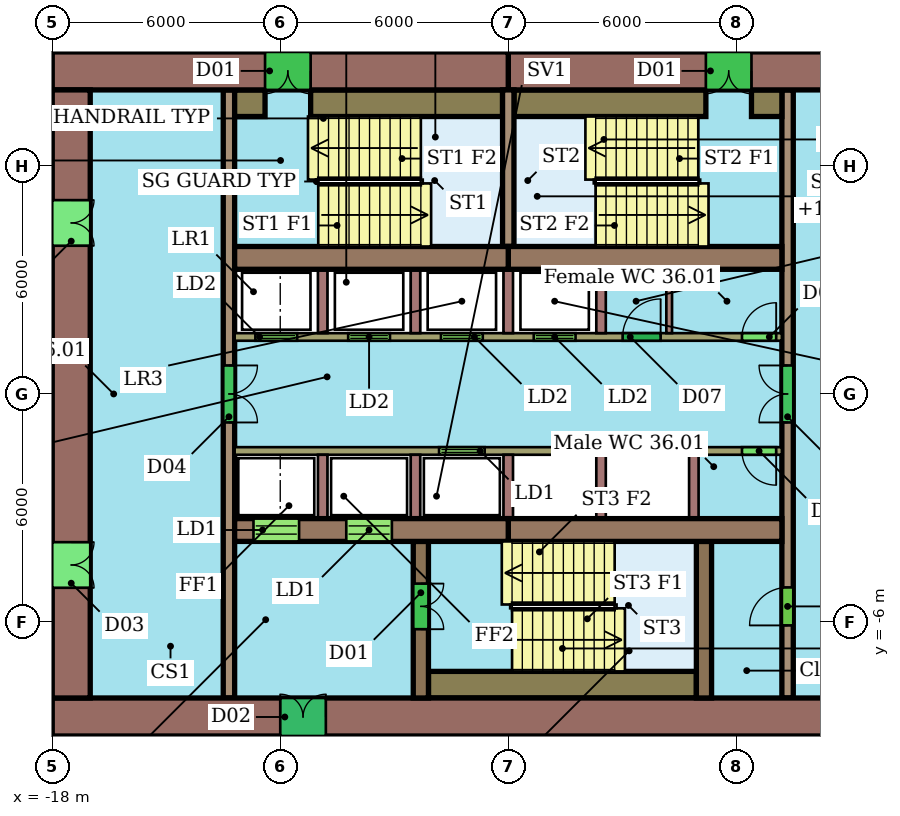
"""IFC4 building model, lengths in metres.
Left out: names, types, materials, properties, quantities, classifications, styles, units other than length and angle.
Written with IfcOpenShell. Run it as: python <this file> out.ifc"""

import sys

from ifc_helpers import new_model, si_unit, direction, frame, frame_2d, origin, place, context, subcontext, project, spatial, rectangle, extrude, element, fill, save


model = new_model("IFC4")
c1 = context("Model", 3, precision=1e-05, world=origin(), true_north=direction((0.0, 1.0)))
c2 = subcontext(c1, "Body", "Model", "MODEL_VIEW")
j1 = project(units=[si_unit("LENGTHUNIT", "METRE"), si_unit("PLANEANGLEUNIT", "RADIAN")], contexts=[c1])
p1 = place(None, origin())
s1 = spatial("IfcSite", under=j1, at=p1, CompositionType="ELEMENT")
p2 = place(p1, origin())
s2 = spatial("IfcBuilding", under=s1, at=p2, CompositionType="ELEMENT")
p3 = place(p2, frame((0.0, 0.0, 154.2)))
s3 = spatial("IfcBuildingStorey", under=s2, at=p3, CompositionType="ELEMENT", Elevation=154.2)
p4 = place(p3, frame((6.0, 8.5, 0.0), z_axis=(0.0, 0.0, 1.0), x_axis=(-1.0, 0.0, 0.0)))
e1 = element("IfcWall", 1, at=p4, inside=s3, PredefinedType="SHEAR", context=c2, shape_type="SweptSolid", body=[
    extrude(rectangle(XDim=12.0, YDim=1.0, at=frame_2d((6.0, 0.0))), origin(), (0.0, 0.0, 1.0), 3.3),
])
p5 = place(p4, frame((5.6, 0.0, 0.0)))
e2 = element("IfcOpeningElement", 2, at=p5, cuts=e1, PredefinedType="OPENING", context=c2, shape_type="SweptSolid", body=[
    extrude(rectangle(XDim=1.2, YDim=2.1, at=frame_2d((0.6, 1.05))), frame((0.0, 0.51, 0.0), z_axis=(0.0, -1.0, 0.0), x_axis=(1.0, 0.0, 0.0)), (0.0, 0.0, 1.0), 1.02),
])
p6 = place(p3, frame((-6.0, 8.5, 0.0), z_axis=(0.0, 0.0, 1.0), x_axis=(-1.0, 0.0, 0.0)))
e3 = element("IfcWall", 3, at=p6, inside=s3, PredefinedType="SHEAR", context=c2, shape_type="SweptSolid", body=[
    extrude(rectangle(XDim=12.0, YDim=1.0, at=frame_2d((6.0, 0.0))), origin(), (0.0, 0.0, 1.0), 3.3),
])
p7 = place(p6, frame((5.2, 0.0, 0.0)))
e4 = element("IfcOpeningElement", 4, at=p7, cuts=e3, PredefinedType="OPENING", context=c2, shape_type="SweptSolid", body=[
    extrude(rectangle(XDim=1.2, YDim=2.1, at=frame_2d((0.6, 1.05))), frame((0.0, 0.51, 0.0), z_axis=(0.0, -1.0, 0.0), x_axis=(1.0, 0.0, 0.0)), (0.0, 0.0, 1.0), 1.02),
])
p8 = place(p3, frame((-18.0, -8.5, 0.0), z_axis=(0.0, 0.0, 1.0), x_axis=(1.0, 0.0, 0.0)))
e5 = element("IfcWall", 5, at=p8, inside=s3, PredefinedType="SHEAR", context=c2, shape_type="SweptSolid", body=[
    extrude(rectangle(XDim=24.0, YDim=1.0, at=frame_2d((12.0, 0.0))), origin(), (0.0, 0.0, 1.0), 3.3),
])
p9 = place(p8, frame((6.0, 0.0, 0.0)))
e6 = element("IfcOpeningElement", 6, at=p9, cuts=e5, PredefinedType="OPENING", context=c2, shape_type="SweptSolid", body=[
    extrude(rectangle(XDim=1.2, YDim=2.1, at=frame_2d((0.6, 1.05))), frame((0.0, 0.51, 0.0), z_axis=(0.0, -1.0, 0.0), x_axis=(1.0, 0.0, 0.0)), (0.0, 0.0, 1.0), 1.02),
])
p10 = place(p3, frame((-17.5, 8.0, 0.0), z_axis=(0.0, 0.0, 1.0), x_axis=(0.0, -1.0, 0.0)))
e7 = element("IfcWall", 7, at=p10, inside=s3, PredefinedType="SHEAR", context=c2, shape_type="SweptSolid", body=[
    extrude(rectangle(XDim=16.0, YDim=1.0, at=frame_2d((8.0, 0.0))), origin(), (0.0, 0.0, 1.0), 3.3),
])
p11 = place(p10, frame((11.9, 0.0, 0.0)))
e8 = element("IfcOpeningElement", 8, at=p11, cuts=e7, PredefinedType="OPENING", context=c2, shape_type="SweptSolid", body=[
    extrude(rectangle(XDim=1.2, YDim=2.1, at=frame_2d((0.6, 1.05))), frame((0.0, 0.51, 0.0), z_axis=(0.0, -1.0, 0.0), x_axis=(1.0, 0.0, 0.0)), (0.0, 0.0, 1.0), 1.02),
])
p12 = place(p10, frame((2.9, 0.0, 0.0)))
e9 = element("IfcOpeningElement", 9, at=p12, cuts=e7, PredefinedType="OPENING", context=c2, shape_type="SweptSolid", body=[
    extrude(rectangle(XDim=1.2, YDim=2.1, at=frame_2d((0.6, 1.05))), frame((0.0, 0.51, 0.0), z_axis=(0.0, -1.0, 0.0), x_axis=(1.0, 0.0, 0.0)), (0.0, 0.0, 1.0), 1.02),
])
for number, where, z_axis, x_axis in (
    (10, (-13.2, 3.58, 0.0), (0.0, 0.0, 1.0), (1.0, 0.0, 0.0)),
    (11, (-6.0, 3.58, 0.0), (0.0, 0.0, 1.0), (1.0, 0.0, 0.0)),
):
    element("IfcWall", number, at=place(p3, frame(where, z_axis=z_axis, x_axis=x_axis)), inside=s3, PredefinedType="SHEAR", context=c2, shape_type="SweptSolid", body=[
        extrude(rectangle(XDim=7.2, YDim=0.6, at=frame_2d((3.6, 0.0))), origin(), (0.0, 0.0, 1.0), 3.3),
    ])
p13 = place(p3, frame((-13.2, -3.58, 0.0), z_axis=(0.0, 0.0, 1.0), x_axis=(1.0, 0.0, 0.0)))
e12 = element("IfcWall", 12, at=p13, inside=s3, PredefinedType="SHEAR", context=c2, shape_type="SweptSolid", body=[
    extrude(rectangle(XDim=7.2, YDim=0.6, at=frame_2d((3.6, 0.0))), origin(), (0.0, 0.0, 1.0), 3.3),
])
p14 = place(p13, frame((0.496, 0.0, 0.0)))
e13 = element("IfcOpeningElement", 13, at=p14, cuts=e12, PredefinedType="OPENING", context=c2, shape_type="SweptSolid", body=[
    extrude(rectangle(XDim=1.2, YDim=2.1, at=frame_2d((0.6, 1.05))), frame((0.0, 0.31, 0.0), z_axis=(0.0, -1.0, 0.0), x_axis=(1.0, 0.0, 0.0)), (0.0, 0.0, 1.0), 0.62),
])
p15 = place(p13, frame((2.938, 0.0, 0.0)))
e14 = element("IfcOpeningElement", 14, at=p15, cuts=e12, PredefinedType="OPENING", context=c2, shape_type="SweptSolid", body=[
    extrude(rectangle(XDim=1.2, YDim=2.1, at=frame_2d((0.6, 1.05))), frame((0.0, 0.31, 0.0), z_axis=(0.0, -1.0, 0.0), x_axis=(1.0, 0.0, 0.0)), (0.0, 0.0, 1.0), 0.62),
])
p16 = place(p3, frame((-6.0, -3.58, 0.0), z_axis=(0.0, 0.0, 1.0), x_axis=(1.0, 0.0, 0.0)))
e15 = element("IfcWall", 15, at=p16, inside=s3, PredefinedType="SHEAR", context=c2, shape_type="SweptSolid", body=[
    extrude(rectangle(XDim=7.2, YDim=0.6, at=frame_2d((3.6, 0.0))), origin(), (0.0, 0.0, 1.0), 3.3),
])
p17 = place(p3, frame((-13.35, 8.0, 0.0), z_axis=(0.0, 0.0, 1.0), x_axis=(0.0, -1.0, 0.0)))
e16 = element("IfcWall", 16, at=p17, inside=s3, PredefinedType="SHEAR", context=c2, shape_type="SweptSolid", body=[
    extrude(rectangle(XDim=16.0, YDim=0.3, at=frame_2d((8.0, 0.0))), origin(), (0.0, 0.0, 1.0), 3.3),
])
p18 = place(p17, frame((7.25, 0.0, 0.0)))
e17 = element("IfcOpeningElement", 17, at=p18, cuts=e16, PredefinedType="OPENING", context=c2, shape_type="SweptSolid", body=[
    extrude(rectangle(XDim=1.5, YDim=2.1, at=frame_2d((0.75, 1.05))), frame((0.0, 0.16, 0.0), z_axis=(0.0, -1.0, 0.0), x_axis=(1.0, 0.0, 0.0)), (0.0, 0.0, 1.0), 0.32),
])
p19 = place(p3, frame((1.35, -8.0, 0.0), z_axis=(0.0, 0.0, 1.0), x_axis=(0.0, 1.0, 0.0)))
e18 = element("IfcWall", 18, at=p19, inside=s3, PredefinedType="SHEAR", context=c2, shape_type="SweptSolid", body=[
    extrude(rectangle(XDim=16.0, YDim=0.3, at=frame_2d((8.0, 0.0))), origin(), (0.0, 0.0, 1.0), 3.3),
])
p20 = place(p19, frame((1.91, 0.0, 0.0)))
e19 = element("IfcOpeningElement", 19, at=p20, cuts=e18, PredefinedType="OPENING", context=c2, shape_type="SweptSolid", body=[
    extrude(rectangle(XDim=1.0, YDim=2.1, at=frame_2d((0.5, 1.05))), frame((0.0, 0.16, 0.0), z_axis=(0.0, -1.0, 0.0), x_axis=(1.0, 0.0, 0.0)), (0.0, 0.0, 1.0), 0.32),
])
p21 = place(p19, frame((7.25, 0.0, 0.0)))
e20 = element("IfcOpeningElement", 20, at=p21, cuts=e18, PredefinedType="OPENING", context=c2, shape_type="SweptSolid", body=[
    extrude(rectangle(XDim=1.5, YDim=2.1, at=frame_2d((0.75, 1.05))), frame((0.0, 0.16, 0.0), z_axis=(0.0, -1.0, 0.0), x_axis=(1.0, 0.0, 0.0)), (0.0, 0.0, 1.0), 0.32),
])
p22 = place(p3, frame((-13.2, 1.5, 0.0), z_axis=(0.0, 0.0, 1.0), x_axis=(1.0, 0.0, 0.0)))
e21 = element("IfcWall", 21, at=p22, inside=s3, PredefinedType="SHEAR", context=c2, shape_type="SweptSolid", body=[
    extrude(rectangle(XDim=14.4, YDim=0.2, at=frame_2d((7.2, 0.0))), origin(), (0.0, 0.0, 1.0), 3.3),
])
p23 = place(p22, frame((0.546, 0.0, 0.0)))
e22 = element("IfcOpeningElement", 22, at=p23, cuts=e21, PredefinedType="OPENING", context=c2, shape_type="SweptSolid", body=[
    extrude(rectangle(XDim=1.1, YDim=2.1, at=frame_2d((0.55, 1.05))), frame((0.0, 0.11, 0.0), z_axis=(0.0, -1.0, 0.0), x_axis=(1.0, 0.0, 0.0)), (0.0, 0.0, 1.0), 0.22),
])
p24 = place(p22, frame((2.988, 0.0, 0.0)))
e23 = element("IfcOpeningElement", 23, at=p24, cuts=e21, PredefinedType="OPENING", context=c2, shape_type="SweptSolid", body=[
    extrude(rectangle(XDim=1.1, YDim=2.1, at=frame_2d((0.55, 1.05))), frame((0.0, 0.11, 0.0), z_axis=(0.0, -1.0, 0.0), x_axis=(1.0, 0.0, 0.0)), (0.0, 0.0, 1.0), 0.22),
])
p25 = place(p22, frame((5.429, 0.0, 0.0)))
e24 = element("IfcOpeningElement", 24, at=p25, cuts=e21, PredefinedType="OPENING", context=c2, shape_type="SweptSolid", body=[
    extrude(rectangle(XDim=1.1, YDim=2.1, at=frame_2d((0.55, 1.05))), frame((0.0, 0.11, 0.0), z_axis=(0.0, -1.0, 0.0), x_axis=(1.0, 0.0, 0.0)), (0.0, 0.0, 1.0), 0.22),
])
p26 = place(p22, frame((7.871, 0.0, 0.0)))
e25 = element("IfcOpeningElement", 25, at=p26, cuts=e21, PredefinedType="OPENING", context=c2, shape_type="SweptSolid", body=[
    extrude(rectangle(XDim=1.1, YDim=2.1, at=frame_2d((0.55, 1.05))), frame((0.0, 0.11, 0.0), z_axis=(0.0, -1.0, 0.0), x_axis=(1.0, 0.0, 0.0)), (0.0, 0.0, 1.0), 0.22),
])
p27 = place(p22, frame((10.21, 0.0, 0.0)))
e26 = element("IfcOpeningElement", 26, at=p27, cuts=e21, PredefinedType="OPENING", context=c2, shape_type="SweptSolid", body=[
    extrude(rectangle(XDim=1.0, YDim=2.1, at=frame_2d((0.5, 1.05))), frame((0.0, 0.11, 0.0), z_axis=(0.0, -1.0, 0.0), x_axis=(1.0, 0.0, 0.0)), (0.0, 0.0, 1.0), 0.22),
])
p28 = place(p22, frame((13.35, 0.0, 0.0)))
e27 = element("IfcOpeningElement", 27, at=p28, cuts=e21, PredefinedType="OPENING", context=c2, shape_type="SweptSolid", body=[
    extrude(rectangle(XDim=0.9, YDim=2.1, at=frame_2d((0.45, 1.05))), frame((0.0, 0.11, 0.0), z_axis=(0.0, -1.0, 0.0), x_axis=(1.0, 0.0, 0.0)), (0.0, 0.0, 1.0), 0.22),
])
p29 = place(p3, frame((1.2, -1.5, 0.0), z_axis=(0.0, 0.0, 1.0), x_axis=(-1.0, 0.0, 0.0)))
e28 = element("IfcWall", 28, at=p29, inside=s3, PredefinedType="SHEAR", context=c2, shape_type="SweptSolid", body=[
    extrude(rectangle(XDim=14.4, YDim=0.2, at=frame_2d((7.2, 0.0))), origin(), (0.0, 0.0, 1.0), 3.3),
])
p30 = place(p29, frame((7.821, 0.0, 0.0)))
e29 = element("IfcOpeningElement", 29, at=p30, cuts=e28, PredefinedType="OPENING", context=c2, shape_type="SweptSolid", body=[
    extrude(rectangle(XDim=1.2, YDim=2.1, at=frame_2d((0.6, 1.05))), frame((0.0, 0.11, 0.0), z_axis=(0.0, -1.0, 0.0), x_axis=(1.0, 0.0, 0.0)), (0.0, 0.0, 1.0), 0.22),
])
p31 = place(p29, frame((0.15, 0.0, 0.0)))
e30 = element("IfcOpeningElement", 30, at=p31, cuts=e28, PredefinedType="OPENING", context=c2, shape_type="SweptSolid", body=[
    extrude(rectangle(XDim=0.9, YDim=2.1, at=frame_2d((0.45, 1.05))), frame((0.0, 0.11, 0.0), z_axis=(0.0, -1.0, 0.0), x_axis=(1.0, 0.0, 0.0)), (0.0, 0.0, 1.0), 0.22),
])
p32 = place(p3, frame((-8.3, -3.88, 0.0), z_axis=(0.0, 0.0, 1.0), x_axis=(0.0, -1.0, 0.0)))
e31 = element("IfcWall", 31, at=p32, inside=s3, PredefinedType="SHEAR", context=c2, shape_type="SweptSolid", body=[
    extrude(rectangle(XDim=4.12, YDim=0.4, at=frame_2d((2.06, 0.0))), origin(), (0.0, 0.0, 1.0), 3.3),
])
p33 = place(p32, frame((1.11, 0.0, 0.0)))
e32 = element("IfcOpeningElement", 32, at=p33, cuts=e31, PredefinedType="OPENING", context=c2, shape_type="SweptSolid", body=[
    extrude(rectangle(XDim=1.2, YDim=2.1, at=frame_2d((0.6, 1.05))), frame((0.0, 0.21, 0.0), z_axis=(0.0, -1.0, 0.0), x_axis=(1.0, 0.0, 0.0)), (0.0, 0.0, 1.0), 0.42),
])
p34 = place(p3, frame((-0.85, -3.88, 0.0), z_axis=(0.0, 0.0, 1.0), x_axis=(0.0, -1.0, 0.0)))
e33 = element("IfcWall", 33, at=p34, inside=s3, PredefinedType="SHEAR", context=c2, shape_type="SweptSolid", body=[
    extrude(rectangle(XDim=4.12, YDim=0.4, at=frame_2d((2.06, 0.0))), origin(), (0.0, 0.0, 1.0), 3.3),
])
p35 = place(p3, frame((-6.0, 3.88, 0.0), z_axis=(0.0, 0.0, 1.0), x_axis=(0.0, 1.0, 0.0)))
e34 = element("IfcWall", 34, at=p35, inside=s3, PredefinedType="SHEAR", context=c2, shape_type="SweptSolid", body=[
    extrude(rectangle(XDim=4.12, YDim=0.3, at=frame_2d((2.06, 0.0))), origin(), (0.0, 0.0, 1.0), 3.3),
])
p36 = place(p3, frame((-13.2, 7.65, 0.0), z_axis=(0.0, 0.0, 1.0), x_axis=(1.0, 0.0, 0.0)))
e35 = element("IfcWall", 35, at=p36, inside=s3, PredefinedType="SHEAR", context=c2, shape_type="SweptSolid", body=[
    extrude(rectangle(XDim=0.8, YDim=0.7, at=frame_2d((0.4, 0.0))), origin(), (0.0, 0.0, 1.0), 3.3),
])
for number, where, z_axis, x_axis in (
    (36, (-11.2, 7.65, 0.0), (0.0, 0.0, 1.0), (1.0, 0.0, 0.0)),
    (37, (-5.85, 7.65, 0.0), (0.0, 0.0, 1.0), (1.0, 0.0, 0.0)),
):
    element("IfcWall", number, at=place(p3, frame(where, z_axis=z_axis, x_axis=x_axis)), inside=s3, PredefinedType="SHEAR", context=c2, shape_type="SweptSolid", body=[
        extrude(rectangle(XDim=5.05, YDim=0.7, at=frame_2d((2.525, 0.0))), origin(), (0.0, 0.0, 1.0), 3.3),
    ])
p37 = place(p3, frame((0.4, 7.65, 0.0), z_axis=(0.0, 0.0, 1.0), x_axis=(1.0, 0.0, 0.0)))
e38 = element("IfcWall", 38, at=p37, inside=s3, PredefinedType="SHEAR", context=c2, shape_type="SweptSolid", body=[
    extrude(rectangle(XDim=0.8, YDim=0.7, at=frame_2d((0.4, 0.0))), origin(), (0.0, 0.0, 1.0), 3.3),
])
p38 = place(p3, frame((-8.1, -7.65, 0.0), z_axis=(0.0, 0.0, 1.0), x_axis=(1.0, 0.0, 0.0)))
e39 = element("IfcWall", 39, at=p38, inside=s3, PredefinedType="SHEAR", context=c2, shape_type="SweptSolid", body=[
    extrude(rectangle(XDim=7.05, YDim=0.7, at=frame_2d((3.525, 0.0))), origin(), (0.0, 0.0, 1.0), 3.3),
])
for number, where, z_axis, x_axis in (
    (40, (-10.883, 1.6, 0.0), (0.0, 0.0, 1.0), (0.0, 1.0, 0.0)),
    (41, (-8.442, 1.6, 0.0), (0.0, 0.0, 1.0), (0.0, 1.0, 0.0)),
    (42, (-6.0, 1.6, 0.0), (0.0, 0.0, 1.0), (0.0, 1.0, 0.0)),
    (43, (-3.558, 1.6, 0.0), (0.0, 0.0, 1.0), (0.0, 1.0, 0.0)),
):
    element("IfcWall", number, at=place(p3, frame(where, z_axis=z_axis, x_axis=x_axis)), inside=s3, PredefinedType="SHEAR", context=c2, shape_type="SweptSolid", body=[
        extrude(rectangle(XDim=1.68, YDim=0.25, at=frame_2d((0.84, 0.0))), origin(), (0.0, 0.0, 1.0), 3.3),
    ])
p39 = place(p3, frame((-1.765, 1.6, 0.0), z_axis=(0.0, 0.0, 1.0), x_axis=(0.0, 1.0, 0.0)))
e44 = element("IfcWall", 44, at=p39, inside=s3, PredefinedType="PARTITIONING", context=c2, shape_type="SweptSolid", body=[
    extrude(rectangle(XDim=1.68, YDim=0.15, at=frame_2d((0.84, 0.0))), origin(), (0.0, 0.0, 1.0), 3.3),
])
for number, where, z_axis, x_axis in (
    (45, (-10.883, -1.6, 0.0), (0.0, 0.0, 1.0), (0.0, -1.0, 0.0)),
    (46, (-8.442, -1.6, 0.0), (0.0, 0.0, 1.0), (0.0, -1.0, 0.0)),
    (47, (-6.0, -1.6, 0.0), (0.0, 0.0, 1.0), (0.0, -1.0, 0.0)),
    (48, (-3.558, -1.6, 0.0), (0.0, 0.0, 1.0), (0.0, -1.0, 0.0)),
    (49, (-1.117, -1.6, 0.0), (0.0, 0.0, 1.0), (0.0, -1.0, 0.0)),
):
    element("IfcWall", number, at=place(p3, frame(where, z_axis=z_axis, x_axis=x_axis)), inside=s3, PredefinedType="SHEAR", context=c2, shape_type="SweptSolid", body=[
        extrude(rectangle(XDim=1.68, YDim=0.25, at=frame_2d((0.84, 0.0))), origin(), (0.0, 0.0, 1.0), 3.3),
    ])
p40 = place(p5, origin())
e50 = element("IfcDoor", 50, at=p40, inside=s3, OperationType="DOUBLE_DOOR_SINGLE_SWING", PredefinedType="NOTDEFINED", context=c2, shape_type="SweptSolid", body=[
    extrude(rectangle(XDim=1.2, YDim=2.1, at=frame_2d((0.6, 1.05))), frame((0.0, 0.025, 0.0), z_axis=(0.0, -1.0, 0.0), x_axis=(1.0, 0.0, 0.0)), (0.0, 0.0, 1.0), 0.05),
])
fill(e2, e50)
p41 = place(p7, origin())
e51 = element("IfcDoor", 51, at=p41, inside=s3, OperationType="DOUBLE_DOOR_SINGLE_SWING", PredefinedType="NOTDEFINED", context=c2, shape_type="SweptSolid", body=[
    extrude(rectangle(XDim=1.2, YDim=2.1, at=frame_2d((0.6, 1.05))), frame((0.0, 0.025, 0.0), z_axis=(0.0, -1.0, 0.0), x_axis=(1.0, 0.0, 0.0)), (0.0, 0.0, 1.0), 0.05),
])
fill(e4, e51)
p42 = place(p9, origin())
e52 = element("IfcDoor", 52, at=p42, inside=s3, OperationType="DOUBLE_DOOR_SINGLE_SWING", PredefinedType="NOTDEFINED", context=c2, shape_type="SweptSolid", body=[
    extrude(rectangle(XDim=1.2, YDim=2.1, at=frame_2d((0.6, 1.05))), frame((0.0, 0.025, 0.0), z_axis=(0.0, -1.0, 0.0), x_axis=(1.0, 0.0, 0.0)), (0.0, 0.0, 1.0), 0.05),
])
fill(e6, e52)
p43 = place(p11, origin())
e53 = element("IfcDoor", 53, at=p43, inside=s3, OperationType="DOUBLE_DOOR_SINGLE_SWING", PredefinedType="NOTDEFINED", context=c2, shape_type="SweptSolid", body=[
    extrude(rectangle(XDim=1.2, YDim=2.1, at=frame_2d((0.6, 1.05))), frame((0.0, 0.025, 0.0), z_axis=(0.0, -1.0, 0.0), x_axis=(1.0, 0.0, 0.0)), (0.0, 0.0, 1.0), 0.05),
])
fill(e8, e53)
p44 = place(p12, origin())
e54 = element("IfcDoor", 54, at=p44, inside=s3, OperationType="DOUBLE_DOOR_SINGLE_SWING", PredefinedType="NOTDEFINED", context=c2, shape_type="SweptSolid", body=[
    extrude(rectangle(XDim=1.2, YDim=2.1, at=frame_2d((0.6, 1.05))), frame((0.0, 0.025, 0.0), z_axis=(0.0, -1.0, 0.0), x_axis=(1.0, 0.0, 0.0)), (0.0, 0.0, 1.0), 0.05),
])
fill(e9, e54)
p45 = place(p14, origin())
e55 = element("IfcDoor", 55, at=p45, inside=s3, OperationType="DOUBLE_DOOR_SLIDING", PredefinedType="NOTDEFINED", context=c2, shape_type="SweptSolid", body=[
    extrude(rectangle(XDim=1.2, YDim=2.1, at=frame_2d((0.6, 1.05))), frame((0.0, 0.025, 0.0), z_axis=(0.0, -1.0, 0.0), x_axis=(1.0, 0.0, 0.0)), (0.0, 0.0, 1.0), 0.05),
])
fill(e13, e55)
p46 = place(p15, origin())
e56 = element("IfcDoor", 56, at=p46, inside=s3, OperationType="DOUBLE_DOOR_SLIDING", PredefinedType="NOTDEFINED", context=c2, shape_type="SweptSolid", body=[
    extrude(rectangle(XDim=1.2, YDim=2.1, at=frame_2d((0.6, 1.05))), frame((0.0, 0.025, 0.0), z_axis=(0.0, -1.0, 0.0), x_axis=(1.0, 0.0, 0.0)), (0.0, 0.0, 1.0), 0.05),
])
fill(e14, e56)
p47 = place(p18, origin())
e57 = element("IfcDoor", 57, at=p47, inside=s3, OperationType="DOUBLE_DOOR_SINGLE_SWING", PredefinedType="NOTDEFINED", context=c2, shape_type="SweptSolid", body=[
    extrude(rectangle(XDim=1.5, YDim=2.1, at=frame_2d((0.75, 1.05))), frame((0.0, 0.025, 0.0), z_axis=(0.0, -1.0, 0.0), x_axis=(1.0, 0.0, 0.0)), (0.0, 0.0, 1.0), 0.05),
])
fill(e17, e57)
p48 = place(p20, origin())
e58 = element("IfcDoor", 58, at=p48, inside=s3, OperationType="SINGLE_SWING_LEFT", PredefinedType="NOTDEFINED", context=c2, shape_type="SweptSolid", body=[
    extrude(rectangle(XDim=1.0, YDim=2.1, at=frame_2d((0.5, 1.05))), frame((0.0, 0.025, 0.0), z_axis=(0.0, -1.0, 0.0), x_axis=(1.0, 0.0, 0.0)), (0.0, 0.0, 1.0), 0.05),
])
fill(e19, e58)
p49 = place(p21, origin())
e59 = element("IfcDoor", 59, at=p49, inside=s3, OperationType="DOUBLE_DOOR_SINGLE_SWING", PredefinedType="NOTDEFINED", context=c2, shape_type="SweptSolid", body=[
    extrude(rectangle(XDim=1.5, YDim=2.1, at=frame_2d((0.75, 1.05))), frame((0.0, 0.025, 0.0), z_axis=(0.0, -1.0, 0.0), x_axis=(1.0, 0.0, 0.0)), (0.0, 0.0, 1.0), 0.05),
])
fill(e20, e59)
p50 = place(p23, origin())
e60 = element("IfcDoor", 60, at=p50, inside=s3, OperationType="DOUBLE_DOOR_SLIDING", PredefinedType="NOTDEFINED", context=c2, shape_type="SweptSolid", body=[
    extrude(rectangle(XDim=1.1, YDim=2.1, at=frame_2d((0.55, 1.05))), frame((0.0, 0.025, 0.0), z_axis=(0.0, -1.0, 0.0), x_axis=(1.0, 0.0, 0.0)), (0.0, 0.0, 1.0), 0.05),
])
fill(e22, e60)
p51 = place(p24, origin())
e61 = element("IfcDoor", 61, at=p51, inside=s3, OperationType="DOUBLE_DOOR_SLIDING", PredefinedType="NOTDEFINED", context=c2, shape_type="SweptSolid", body=[
    extrude(rectangle(XDim=1.1, YDim=2.1, at=frame_2d((0.55, 1.05))), frame((0.0, 0.025, 0.0), z_axis=(0.0, -1.0, 0.0), x_axis=(1.0, 0.0, 0.0)), (0.0, 0.0, 1.0), 0.05),
])
fill(e23, e61)
p52 = place(p25, origin())
e62 = element("IfcDoor", 62, at=p52, inside=s3, OperationType="DOUBLE_DOOR_SLIDING", PredefinedType="NOTDEFINED", context=c2, shape_type="SweptSolid", body=[
    extrude(rectangle(XDim=1.1, YDim=2.1, at=frame_2d((0.55, 1.05))), frame((0.0, 0.025, 0.0), z_axis=(0.0, -1.0, 0.0), x_axis=(1.0, 0.0, 0.0)), (0.0, 0.0, 1.0), 0.05),
])
fill(e24, e62)
p53 = place(p26, origin())
e63 = element("IfcDoor", 63, at=p53, inside=s3, OperationType="DOUBLE_DOOR_SLIDING", PredefinedType="NOTDEFINED", context=c2, shape_type="SweptSolid", body=[
    extrude(rectangle(XDim=1.1, YDim=2.1, at=frame_2d((0.55, 1.05))), frame((0.0, 0.025, 0.0), z_axis=(0.0, -1.0, 0.0), x_axis=(1.0, 0.0, 0.0)), (0.0, 0.0, 1.0), 0.05),
])
fill(e25, e63)
p54 = place(p27, origin())
e64 = element("IfcDoor", 64, at=p54, inside=s3, OperationType="SINGLE_SWING_RIGHT", PredefinedType="NOTDEFINED", context=c2, shape_type="SweptSolid", body=[
    extrude(rectangle(XDim=1.0, YDim=2.1, at=frame_2d((0.5, 1.05))), frame((0.0, 0.025, 0.0), z_axis=(0.0, -1.0, 0.0), x_axis=(1.0, 0.0, 0.0)), (0.0, 0.0, 1.0), 0.05),
])
fill(e26, e64)
p55 = place(p28, origin())
e65 = element("IfcDoor", 65, at=p55, inside=s3, OperationType="SINGLE_SWING_RIGHT", PredefinedType="NOTDEFINED", context=c2, shape_type="SweptSolid", body=[
    extrude(rectangle(XDim=0.9, YDim=2.1, at=frame_2d((0.45, 1.05))), frame((0.0, 0.025, 0.0), z_axis=(0.0, -1.0, 0.0), x_axis=(1.0, 0.0, 0.0)), (0.0, 0.0, 1.0), 0.05),
])
fill(e27, e65)
p56 = place(p30, origin())
e66 = element("IfcDoor", 66, at=p56, inside=s3, OperationType="DOUBLE_DOOR_SLIDING", PredefinedType="NOTDEFINED", context=c2, shape_type="SweptSolid", body=[
    extrude(rectangle(XDim=1.2, YDim=2.1, at=frame_2d((0.6, 1.05))), frame((0.0, 0.025, 0.0), z_axis=(0.0, -1.0, 0.0), x_axis=(1.0, 0.0, 0.0)), (0.0, 0.0, 1.0), 0.05),
])
fill(e29, e66)
p57 = place(p31, origin())
e67 = element("IfcDoor", 67, at=p57, inside=s3, OperationType="SINGLE_SWING_LEFT", PredefinedType="NOTDEFINED", context=c2, shape_type="SweptSolid", body=[
    extrude(rectangle(XDim=0.9, YDim=2.1, at=frame_2d((0.45, 1.05))), frame((0.0, 0.025, 0.0), z_axis=(0.0, -1.0, 0.0), x_axis=(1.0, 0.0, 0.0)), (0.0, 0.0, 1.0), 0.05),
])
fill(e30, e67)
p58 = place(p33, origin())
e68 = element("IfcDoor", 68, at=p58, inside=s3, OperationType="DOUBLE_DOOR_SINGLE_SWING", PredefinedType="NOTDEFINED", context=c2, shape_type="SweptSolid", body=[
    extrude(rectangle(XDim=1.2, YDim=2.1, at=frame_2d((0.6, 1.05))), frame((0.0, 0.025, 0.0), z_axis=(0.0, -1.0, 0.0), x_axis=(1.0, 0.0, 0.0)), (0.0, 0.0, 1.0), 0.05),
])
fill(e32, e68)
save(model, sys.argv[1])
